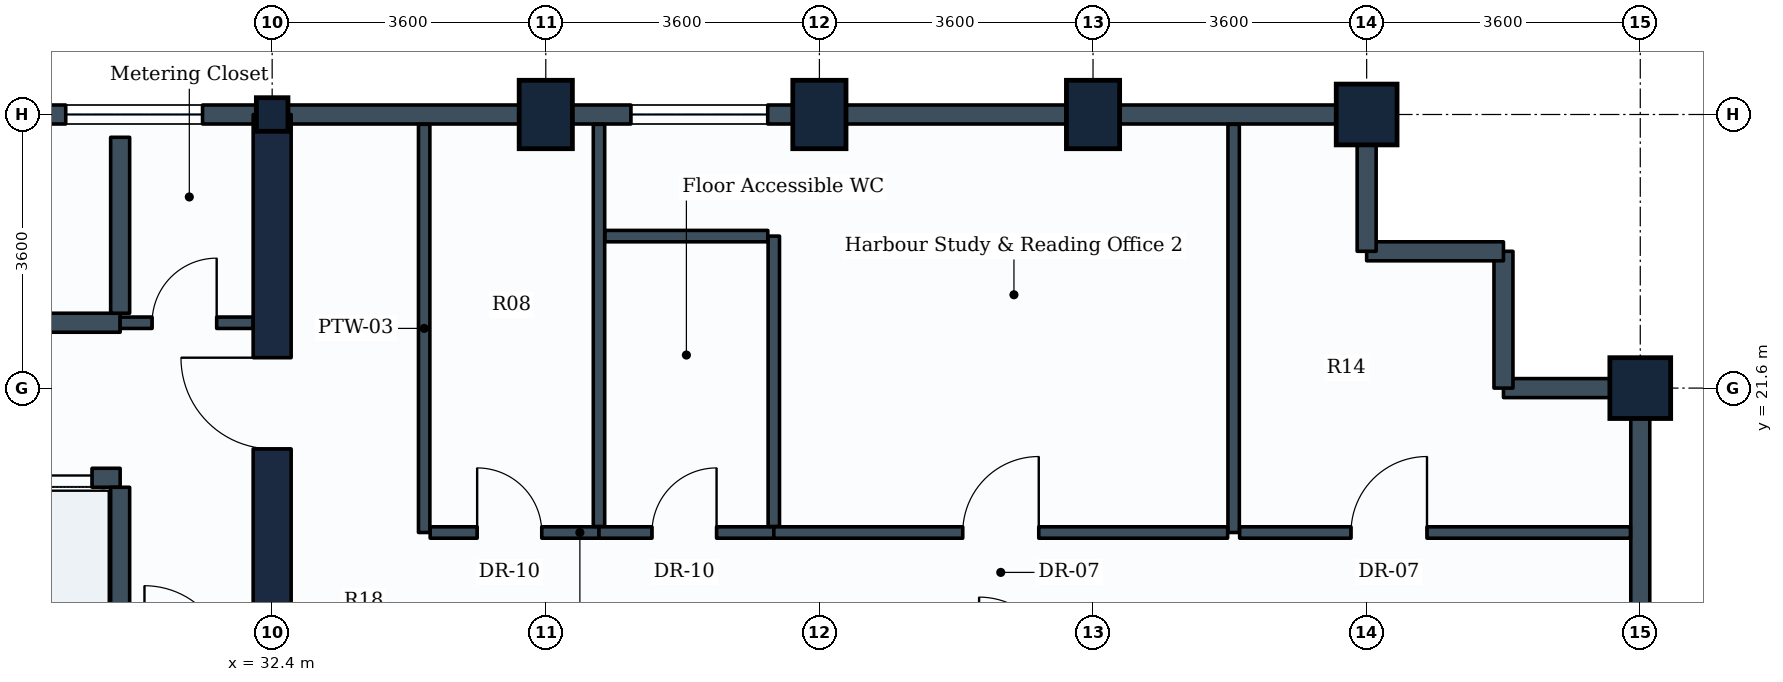
"""IFC4 building model, lengths in metres.
Left out: names, types, materials, properties, quantities, classifications, styles, units other than length and angle.
Written with IfcOpenShell. Run it as: python <this file> out.ifc"""

import sys

from ifc_helpers import new_model, si_unit, direction, frame, frame_2d, origin, origin_2d, place, context, subcontext, project, spatial, rectangle, i_section, extrude, element, fill, save


model = new_model("IFC4")
c1 = context("Model", 3, precision=1e-05, world=origin(), true_north=direction((0.0, 1.0)))
c2 = subcontext(c1, "Body", "Model", "MODEL_VIEW")
j1 = project(units=[si_unit("LENGTHUNIT", "METRE"), si_unit("PLANEANGLEUNIT", "RADIAN")], contexts=[c1])
p1 = place(None, origin())
s1 = spatial("IfcSite", under=j1, at=p1, CompositionType="ELEMENT")
p2 = place(p1, origin())
s2 = spatial("IfcBuilding", under=s1, at=p2, CompositionType="ELEMENT")
p3 = place(p2, frame((0.0, 0.0, 190.0)))
s3 = spatial("IfcBuildingStorey", under=s2, at=p3, CompositionType="ELEMENT", Elevation=190.0)
p4 = place(p3, frame((32.4, 25.2, 0.0), z_axis=(0.0, 0.0, 1.0), x_axis=(1.0, 0.0, 0.0)))
e1 = element("IfcColumn", 1, at=p4, inside=s3, PredefinedType="COLUMN", context=c2, shape_type="SweptSolid", body=[
    extrude(i_section(OverallWidth=0.416, OverallDepth=0.442, WebThickness=0.025, FlangeThickness=0.041, FilletRadius=0.015, at=origin_2d()), origin(), (0.0, 0.0, 1.0), 3.8),
])
for number, where, z_axis, x_axis in (
    (2, (36.0, 25.2, 0.0), (0.0, 0.0, 1.0), (1.0, 0.0, 0.0)),
    (3, (39.6, 25.2, 0.0), (0.0, 0.0, 1.0), (1.0, 0.0, 0.0)),
    (4, (43.2, 25.2, 0.0), (0.0, 0.0, 1.0), (1.0, 0.0, 0.0)),
):
    element("IfcColumn", number, at=place(p3, frame(where, z_axis=z_axis, x_axis=x_axis)), inside=s3, PredefinedType="COLUMN", context=c2, shape_type="SweptSolid", body=[
        extrude(rectangle(XDim=0.7, YDim=0.9, at=origin_2d()), origin(), (0.0, 0.0, 1.0), 3.8),
    ])
for number, where, z_axis, x_axis in (
    (5, (46.8, 25.2, 0.0), (0.0, 0.0, 1.0), (1.0, 0.0, 0.0)),
    (6, (50.4, 21.6, 0.0), (0.0, 0.0, 1.0), (0.0, 1.0, 0.0)),
):
    element("IfcColumn", number, at=place(p3, frame(where, z_axis=z_axis, x_axis=x_axis)), inside=s3, PredefinedType="COLUMN", context=c2, shape_type="SweptSolid", body=[
        extrude(rectangle(XDim=0.8, YDim=0.8, at=origin_2d()), origin(), (0.0, 0.0, 1.0), 3.8),
    ])
p5 = place(p3, frame((50.4, 21.6, 0.0), z_axis=(0.0, 0.0, 1.0), x_axis=(0.0, -1.0, 0.0)))
e7 = element("IfcWall", 7, at=p5, inside=s3, PredefinedType="STANDARD", context=c2, shape_type="SweptSolid", body=[
    extrude(rectangle(XDim=3.6, YDim=0.25, at=frame_2d((1.8, 0.0))), origin(), (0.0, 0.0, 1.0), 2.93),
])
p6 = place(p3, frame((48.6, 21.6, 0.0), z_axis=(0.0, 0.0, 1.0), x_axis=(1.0, 0.0, 0.0)))
e8 = element("IfcWall", 8, at=p6, inside=s3, PredefinedType="STANDARD", context=c2, shape_type="SweptSolid", body=[
    extrude(rectangle(XDim=1.8, YDim=0.25, at=frame_2d((0.9, 0.0))), origin(), (0.0, 0.0, 1.0), 2.93),
])
p7 = place(p3, frame((48.6, 23.4, 0.0), z_axis=(0.0, 0.0, 1.0), x_axis=(0.0, -1.0, 0.0)))
e9 = element("IfcWall", 9, at=p7, inside=s3, PredefinedType="STANDARD", context=c2, shape_type="SweptSolid", body=[
    extrude(rectangle(XDim=1.8, YDim=0.25, at=frame_2d((0.9, 0.0))), origin(), (0.0, 0.0, 1.0), 3.535),
])
p8 = place(p3, frame((46.8, 23.4, 0.0), z_axis=(0.0, 0.0, 1.0), x_axis=(1.0, 0.0, 0.0)))
e10 = element("IfcWall", 10, at=p8, inside=s3, PredefinedType="STANDARD", context=c2, shape_type="SweptSolid", body=[
    extrude(rectangle(XDim=1.8, YDim=0.25, at=frame_2d((0.9, 0.0))), origin(), (0.0, 0.0, 1.0), 3.535),
])
p9 = place(p3, frame((46.8, 25.2, 0.0), z_axis=(0.0, 0.0, 1.0), x_axis=(0.0, -1.0, 0.0)))
e11 = element("IfcWall", 11, at=p9, inside=s3, PredefinedType="STANDARD", context=c2, shape_type="SweptSolid", body=[
    extrude(rectangle(XDim=1.8, YDim=0.25, at=frame_2d((0.9, 0.0))), origin(), (0.0, 0.0, 1.0), 2.93),
])
p10 = place(p3, frame((43.2, 25.2, 0.0), z_axis=(0.0, 0.0, 1.0), x_axis=(1.0, 0.0, 0.0)))
e12 = element("IfcWall", 12, at=p10, inside=s3, PredefinedType="STANDARD", context=c2, shape_type="SweptSolid", body=[
    extrude(rectangle(XDim=3.6, YDim=0.25, at=frame_2d((1.8, 0.0))), origin(), (0.0, 0.0, 1.0), 2.93),
])
p11 = place(p3, frame((39.6, 25.2, 0.0), z_axis=(0.0, 0.0, 1.0), x_axis=(1.0, 0.0, 0.0)))
e13 = element("IfcWall", 13, at=p11, inside=s3, PredefinedType="STANDARD", context=c2, shape_type="SweptSolid", body=[
    extrude(rectangle(XDim=3.6, YDim=0.25, at=frame_2d((1.8, 0.0))), origin(), (0.0, 0.0, 1.0), 2.93),
])
p12 = place(p3, frame((36.0, 25.2, 0.0), z_axis=(0.0, 0.0, 1.0), x_axis=(1.0, 0.0, 0.0)))
e14 = element("IfcWall", 14, at=p12, inside=s3, PredefinedType="STANDARD", context=c2, shape_type="SweptSolid", body=[
    extrude(rectangle(XDim=3.6, YDim=0.25, at=frame_2d((1.8, 0.0))), origin(), (0.0, 0.0, 1.0), 2.93),
])
p13 = place(p12, frame((1.12, 0.0, 0.85)))
e15 = element("IfcOpeningElement", 15, at=p13, cuts=e14, PredefinedType="OPENING", context=c2, shape_type="SweptSolid", body=[
    extrude(rectangle(XDim=1.8, YDim=1.35, at=frame_2d((0.9, 0.675))), frame((0.0, 0.135, 0.0), z_axis=(0.0, -1.0, 0.0), x_axis=(1.0, 0.0, 0.0)), (0.0, 0.0, 1.0), 0.27),
])
p14 = place(p3, frame((32.4, 25.2, 0.0), z_axis=(0.0, 0.0, 1.0), x_axis=(1.0, 0.0, 0.0)))
e16 = element("IfcWall", 16, at=p14, inside=s3, PredefinedType="STANDARD", context=c2, shape_type="SweptSolid", body=[
    extrude(rectangle(XDim=3.6, YDim=0.25, at=frame_2d((1.8, 0.0))), origin(), (0.0, 0.0, 1.0), 2.93),
])
p15 = place(p3, frame((28.8, 25.2, 0.0), z_axis=(0.0, 0.0, 1.0), x_axis=(1.0, 0.0, 0.0)))
e17 = element("IfcWall", 17, at=p15, inside=s3, PredefinedType="STANDARD", context=c2, shape_type="SweptSolid", body=[
    extrude(rectangle(XDim=3.6, YDim=0.25, at=frame_2d((1.8, 0.0))), origin(), (0.0, 0.0, 1.0), 2.93),
])
p16 = place(p15, frame((0.884, 0.0, 0.85)))
e18 = element("IfcOpeningElement", 18, at=p16, cuts=e17, PredefinedType="OPENING", context=c2, shape_type="SweptSolid", body=[
    extrude(rectangle(XDim=1.8, YDim=1.35, at=frame_2d((0.9, 0.675))), frame((0.0, 0.135, 0.0), z_axis=(0.0, -1.0, 0.0), x_axis=(1.0, 0.0, 0.0)), (0.0, 0.0, 1.0), 0.27),
])
p17 = place(p3, frame((32.4, 10.8, 0.0), z_axis=(0.0, 0.0, 1.0), x_axis=(0.0, 1.0, 0.0)))
e19 = element("IfcWall", 19, at=p17, inside=s3, PredefinedType="SHEAR", context=c2, shape_type="SweptSolid", body=[
    extrude(rectangle(XDim=14.4, YDim=0.5, at=frame_2d((7.2, 0.0))), origin(), (0.0, 0.0, 1.0), 3.55),
])
p18 = place(p17, frame((4.35, 0.0, 0.0)))
e20 = element("IfcOpeningElement", 20, at=p18, cuts=e19, PredefinedType="OPENING", context=c2, shape_type="SweptSolid", body=[
    extrude(rectangle(XDim=1.2, YDim=2.1, at=frame_2d((0.6, 1.05))), frame((0.0, 0.26, 0.0), z_axis=(0.0, -1.0, 0.0), x_axis=(1.0, 0.0, 0.0)), (0.0, 0.0, 1.0), 0.52),
])
p19 = place(p17, frame((10.0, 0.0, 0.0)))
e21 = element("IfcOpeningElement", 21, at=p19, cuts=e19, PredefinedType="OPENING", context=c2, shape_type="SweptSolid", body=[
    extrude(rectangle(XDim=1.2, YDim=2.1, at=frame_2d((0.6, 1.05))), frame((0.0, 0.26, 0.0), z_axis=(0.0, -1.0, 0.0), x_axis=(1.0, 0.0, 0.0)), (0.0, 0.0, 1.0), 0.52),
])
p20 = place(p3, frame((23.18, 20.42, 0.0), z_axis=(0.0, 0.0, 1.0), x_axis=(1.0, 0.0, 0.0)))
e22 = element("IfcWall", 22, at=p20, inside=s3, PredefinedType="PARTITIONING", context=c2, shape_type="SweptSolid", body=[
    extrude(rectangle(XDim=7.22, YDim=0.25, at=frame_2d((3.61, 0.0))), origin(), (0.0, 0.0, 1.0), 3.535),
])
p21 = place(p20, frame((0.41, 0.0, 0.0)))
e23 = element("IfcOpeningElement", 23, at=p21, cuts=e22, PredefinedType="OPENING", context=c2, shape_type="SweptSolid", body=[
    extrude(rectangle(XDim=1.1, YDim=2.1, at=frame_2d((0.55, 1.05))), frame((0.0, 0.135, 0.0), z_axis=(0.0, -1.0, 0.0), x_axis=(1.0, 0.0, 0.0)), (0.0, 0.0, 1.0), 0.27),
])
p22 = place(p20, frame((2.19, 0.0, 0.0)))
e24 = element("IfcOpeningElement", 24, at=p22, cuts=e22, PredefinedType="OPENING", context=c2, shape_type="SweptSolid", body=[
    extrude(rectangle(XDim=1.1, YDim=2.1, at=frame_2d((0.55, 1.05))), frame((0.0, 0.135, 0.0), z_axis=(0.0, -1.0, 0.0), x_axis=(1.0, 0.0, 0.0)), (0.0, 0.0, 1.0), 0.27),
])
p23 = place(p20, frame((3.97, 0.0, 0.0)))
e25 = element("IfcOpeningElement", 25, at=p23, cuts=e22, PredefinedType="OPENING", context=c2, shape_type="SweptSolid", body=[
    extrude(rectangle(XDim=1.1, YDim=2.1, at=frame_2d((0.55, 1.05))), frame((0.0, 0.135, 0.0), z_axis=(0.0, -1.0, 0.0), x_axis=(1.0, 0.0, 0.0)), (0.0, 0.0, 1.0), 0.27),
])
p24 = place(p20, frame((5.75, 0.0, 0.0)))
e26 = element("IfcOpeningElement", 26, at=p24, cuts=e22, PredefinedType="OPENING", context=c2, shape_type="SweptSolid", body=[
    extrude(rectangle(XDim=1.1, YDim=2.1, at=frame_2d((0.55, 1.05))), frame((0.0, 0.135, 0.0), z_axis=(0.0, -1.0, 0.0), x_axis=(1.0, 0.0, 0.0)), (0.0, 0.0, 1.0), 0.27),
])
p25 = place(p3, frame((30.4, 18.025, 0.0), z_axis=(0.0, 0.0, 1.0), x_axis=(0.0, 1.0, 0.0)))
e27 = element("IfcWall", 27, at=p25, inside=s3, PredefinedType="PARTITIONING", context=c2, shape_type="SweptSolid", body=[
    extrude(rectangle(XDim=2.27, YDim=0.25, at=frame_2d((1.135, 0.0))), origin(), (0.0, 0.0, 1.0), 3.535),
])
p26 = place(p3, frame((23.18, 22.46, 0.0), z_axis=(0.0, 0.0, 1.0), x_axis=(1.0, 0.0, 0.0)))
e28 = element("IfcWall", 28, at=p26, inside=s3, PredefinedType="PARTITIONING", context=c2, shape_type="SweptSolid", body=[
    extrude(rectangle(XDim=7.22, YDim=0.25, at=frame_2d((3.61, 0.0))), origin(), (0.0, 0.0, 1.0), 3.535),
])
p27 = place(p3, frame((30.4, 22.585, 0.0), z_axis=(0.0, 0.0, 1.0), x_axis=(0.0, 1.0, 0.0)))
e29 = element("IfcWall", 29, at=p27, inside=s3, PredefinedType="PARTITIONING", context=c2, shape_type="SweptSolid", body=[
    extrude(rectangle(XDim=2.315, YDim=0.25, at=frame_2d((1.157, 0.0))), origin(), (0.0, 0.0, 1.0), 3.535),
])
p28 = place(p3, frame((30.4, 22.46, 0.0), z_axis=(0.0, 0.0, 1.0), x_axis=(1.0, 0.0, 0.0)))
e30 = element("IfcWall", 30, at=p28, inside=s3, PredefinedType="PARTITIONING", context=c2, shape_type="SweptSolid", body=[
    extrude(rectangle(XDim=1.75, YDim=0.15, at=frame_2d((0.875, 0.0))), origin(), (0.0, 0.0, 1.0), 3.535),
])
p29 = place(p28, frame((0.42, 0.0, 0.0)))
e31 = element("IfcOpeningElement", 31, at=p29, cuts=e30, PredefinedType="OPENING", context=c2, shape_type="SweptSolid", body=[
    extrude(rectangle(XDim=0.85, YDim=2.1, at=frame_2d((0.425, 1.05))), frame((0.0, 0.085, 0.0), z_axis=(0.0, -1.0, 0.0), x_axis=(1.0, 0.0, 0.0)), (0.0, 0.0, 1.0), 0.17),
])
p30 = place(p3, frame((34.4, 19.7, 0.0), z_axis=(0.0, 0.0, 1.0), x_axis=(0.0, 1.0, 0.0)))
e32 = element("IfcWall", 32, at=p30, inside=s3, PredefinedType="PARTITIONING", context=c2, shape_type="SweptSolid", body=[
    extrude(rectangle(XDim=5.371, YDim=0.15, at=frame_2d((2.686, 0.0))), origin(), (0.0, 0.0, 1.0), 2.93),
])
p31 = place(p3, frame((34.479, 19.7, 0.0), z_axis=(0.0, 0.0, 1.0), x_axis=(1.0, 0.0, 0.0)))
e33 = element("IfcWall", 33, at=p31, inside=s3, PredefinedType="PARTITIONING", context=c2, shape_type="SweptSolid", body=[
    extrude(rectangle(XDim=2.221, YDim=0.15, at=frame_2d((1.11, 0.0))), origin(), (0.0, 0.0, 1.0), 3.22),
])
p32 = place(p31, frame((0.618, 0.0, 0.0)))
e34 = element("IfcOpeningElement", 34, at=p32, cuts=e33, PredefinedType="OPENING", context=c2, shape_type="SweptSolid", body=[
    extrude(rectangle(XDim=0.85, YDim=2.1, at=frame_2d((0.425, 1.05))), frame((0.0, 0.085, 0.0), z_axis=(0.0, -1.0, 0.0), x_axis=(1.0, 0.0, 0.0)), (0.0, 0.0, 1.0), 0.17),
])
p33 = place(p3, frame((36.7, 19.779, 0.0), z_axis=(0.0, 0.0, 1.0), x_axis=(0.0, 1.0, 0.0)))
e35 = element("IfcWall", 35, at=p33, inside=s3, PredefinedType="PARTITIONING", context=c2, shape_type="SweptSolid", body=[
    extrude(rectangle(XDim=5.292, YDim=0.15, at=frame_2d((2.646, 0.0))), origin(), (0.0, 0.0, 1.0), 2.93),
])
p34 = place(p3, frame((36.7, 19.7, 0.0), z_axis=(0.0, 0.0, 1.0), x_axis=(1.0, 0.0, 0.0)))
e36 = element("IfcWall", 36, at=p34, inside=s3, PredefinedType="PARTITIONING", context=c2, shape_type="SweptSolid", body=[
    extrude(rectangle(XDim=2.3, YDim=0.15, at=frame_2d((1.15, 0.0))), origin(), (0.0, 0.0, 1.0), 3.535),
])
p35 = place(p34, frame((0.697, 0.0, 0.0)))
e37 = element("IfcOpeningElement", 37, at=p35, cuts=e36, PredefinedType="OPENING", context=c2, shape_type="SweptSolid", body=[
    extrude(rectangle(XDim=0.85, YDim=2.1, at=frame_2d((0.425, 1.05))), frame((0.0, 0.085, 0.0), z_axis=(0.0, -1.0, 0.0), x_axis=(1.0, 0.0, 0.0)), (0.0, 0.0, 1.0), 0.17),
])
p36 = place(p3, frame((39.0, 19.779, 0.0), z_axis=(0.0, 0.0, 1.0), x_axis=(0.0, 1.0, 0.0)))
e38 = element("IfcWall", 38, at=p36, inside=s3, PredefinedType="PARTITIONING", context=c2, shape_type="SweptSolid", body=[
    extrude(rectangle(XDim=3.821, YDim=0.15, at=frame_2d((1.911, 0.0))), origin(), (0.0, 0.0, 1.0), 3.17),
])
p37 = place(p3, frame((36.779, 23.6, 0.0), z_axis=(0.0, 0.0, 1.0), x_axis=(1.0, 0.0, 0.0)))
e39 = element("IfcWall", 39, at=p37, inside=s3, PredefinedType="PARTITIONING", context=c2, shape_type="SweptSolid", body=[
    extrude(rectangle(XDim=2.142, YDim=0.15, at=frame_2d((1.071, 0.0))), origin(), (0.0, 0.0, 1.0), 3.535),
])
p38 = place(p3, frame((45.05, 19.7, 0.0), z_axis=(0.0, 0.0, 1.0), x_axis=(0.0, 1.0, 0.0)))
e40 = element("IfcWall", 40, at=p38, inside=s3, PredefinedType="PARTITIONING", context=c2, shape_type="SweptSolid", body=[
    extrude(rectangle(XDim=5.371, YDim=0.15, at=frame_2d((2.686, 0.0))), origin(), (0.0, 0.0, 1.0), 2.93),
])
p39 = place(p3, frame((39.0, 19.7, 0.0), z_axis=(0.0, 0.0, 1.0), x_axis=(1.0, 0.0, 0.0)))
e41 = element("IfcWall", 41, at=p39, inside=s3, PredefinedType="PARTITIONING", context=c2, shape_type="SweptSolid", body=[
    extrude(rectangle(XDim=5.971, YDim=0.15, at=frame_2d((2.985, 0.0))), origin(), (0.0, 0.0, 1.0), 3.17),
])
p40 = place(p39, frame((2.486, 0.0, 0.0)))
e42 = element("IfcOpeningElement", 42, at=p40, cuts=e41, PredefinedType="OPENING", context=c2, shape_type="SweptSolid", body=[
    extrude(rectangle(XDim=1.0, YDim=2.1, at=frame_2d((0.5, 1.05))), frame((0.0, 0.085, 0.0), z_axis=(0.0, -1.0, 0.0), x_axis=(1.0, 0.0, 0.0)), (0.0, 0.0, 1.0), 0.17),
])
p41 = place(p3, frame((45.129, 19.7, 0.0), z_axis=(0.0, 0.0, 1.0), x_axis=(1.0, 0.0, 0.0)))
e43 = element("IfcWall", 43, at=p41, inside=s3, PredefinedType="PARTITIONING", context=c2, shape_type="SweptSolid", body=[
    extrude(rectangle(XDim=5.142, YDim=0.15, at=frame_2d((2.571, 0.0))), origin(), (0.0, 0.0, 1.0), 2.93),
])
p42 = place(p41, frame((1.465, 0.0, 0.0)))
e44 = element("IfcOpeningElement", 44, at=p42, cuts=e43, PredefinedType="OPENING", context=c2, shape_type="SweptSolid", body=[
    extrude(rectangle(XDim=1.0, YDim=2.1, at=frame_2d((0.5, 1.05))), frame((0.0, 0.085, 0.0), z_axis=(0.0, -1.0, 0.0), x_axis=(1.0, 0.0, 0.0)), (0.0, 0.0, 1.0), 0.17),
])
p43 = place(p13, origin())
e45 = element("IfcWindow", 45, at=p43, inside=s3, PartitioningType="SINGLE_PANEL", PredefinedType="WINDOW", context=c2, shape_type="SweptSolid", body=[
    extrude(rectangle(XDim=1.8, YDim=1.35, at=frame_2d((0.9, 0.675))), frame((0.0, 0.03, 0.0), z_axis=(0.0, -1.0, 0.0), x_axis=(1.0, 0.0, 0.0)), (0.0, 0.0, 1.0), 0.06),
])
fill(e15, e45)
p44 = place(p16, origin())
e46 = element("IfcWindow", 46, at=p44, inside=s3, PartitioningType="SINGLE_PANEL", PredefinedType="WINDOW", context=c2, shape_type="SweptSolid", body=[
    extrude(rectangle(XDim=1.8, YDim=1.35, at=frame_2d((0.9, 0.675))), frame((0.0, 0.03, 0.0), z_axis=(0.0, -1.0, 0.0), x_axis=(1.0, 0.0, 0.0)), (0.0, 0.0, 1.0), 0.06),
])
fill(e18, e46)
p45 = place(p24, origin())
e47 = element("IfcDoor", 47, at=p45, inside=s3, OperationType="SLIDING_TO_LEFT", PredefinedType="DOOR", context=c2, shape_type="SweptSolid", body=[
    extrude(rectangle(XDim=1.1, YDim=2.1, at=frame_2d((0.55, 1.05))), frame((0.0, 0.025, 0.0), z_axis=(0.0, -1.0, 0.0), x_axis=(1.0, 0.0, 0.0)), (0.0, 0.0, 1.0), 0.05),
])
fill(e26, e47)
p46 = place(p19, origin())
e48 = element("IfcDoor", 48, at=p46, inside=s3, OperationType="SINGLE_SWING_RIGHT", PredefinedType="DOOR", context=c2, shape_type="SweptSolid", body=[
    extrude(rectangle(XDim=1.2, YDim=2.1, at=frame_2d((0.6, 1.05))), frame((0.0, 0.025, 0.0), z_axis=(0.0, -1.0, 0.0), x_axis=(1.0, 0.0, 0.0)), (0.0, 0.0, 1.0), 0.05),
])
fill(e21, e48)
p47 = place(p29, origin())
e49 = element("IfcDoor", 49, at=p47, inside=s3, OperationType="SINGLE_SWING_RIGHT", PredefinedType="DOOR", context=c2, shape_type="SweptSolid", body=[
    extrude(rectangle(XDim=0.85, YDim=2.1, at=frame_2d((0.425, 1.05))), frame((0.0, 0.025, 0.0), z_axis=(0.0, -1.0, 0.0), x_axis=(1.0, 0.0, 0.0)), (0.0, 0.0, 1.0), 0.05),
])
fill(e31, e49)
p48 = place(p32, origin())
e50 = element("IfcDoor", 50, at=p48, inside=s3, OperationType="SINGLE_SWING_LEFT", PredefinedType="DOOR", context=c2, shape_type="SweptSolid", body=[
    extrude(rectangle(XDim=0.85, YDim=2.1, at=frame_2d((0.425, 1.05))), frame((0.0, 0.025, 0.0), z_axis=(0.0, -1.0, 0.0), x_axis=(1.0, 0.0, 0.0)), (0.0, 0.0, 1.0), 0.05),
])
fill(e34, e50)
p49 = place(p35, origin())
e51 = element("IfcDoor", 51, at=p49, inside=s3, OperationType="SINGLE_SWING_RIGHT", PredefinedType="DOOR", context=c2, shape_type="SweptSolid", body=[
    extrude(rectangle(XDim=0.85, YDim=2.1, at=frame_2d((0.425, 1.05))), frame((0.0, 0.025, 0.0), z_axis=(0.0, -1.0, 0.0), x_axis=(1.0, 0.0, 0.0)), (0.0, 0.0, 1.0), 0.05),
])
fill(e37, e51)
p50 = place(p40, origin())
e52 = element("IfcDoor", 52, at=p50, inside=s3, OperationType="SINGLE_SWING_RIGHT", PredefinedType="DOOR", context=c2, shape_type="SweptSolid", body=[
    extrude(rectangle(XDim=1.0, YDim=2.1, at=frame_2d((0.5, 1.05))), frame((0.0, 0.025, 0.0), z_axis=(0.0, -1.0, 0.0), x_axis=(1.0, 0.0, 0.0)), (0.0, 0.0, 1.0), 0.05),
])
fill(e42, e52)
p51 = place(p42, origin())
e53 = element("IfcDoor", 53, at=p51, inside=s3, OperationType="SINGLE_SWING_RIGHT", PredefinedType="DOOR", context=c2, shape_type="SweptSolid", body=[
    extrude(rectangle(XDim=1.0, YDim=2.1, at=frame_2d((0.5, 1.05))), frame((0.0, 0.025, 0.0), z_axis=(0.0, -1.0, 0.0), x_axis=(1.0, 0.0, 0.0)), (0.0, 0.0, 1.0), 0.05),
])
fill(e44, e53)
save(model, sys.argv[1])
